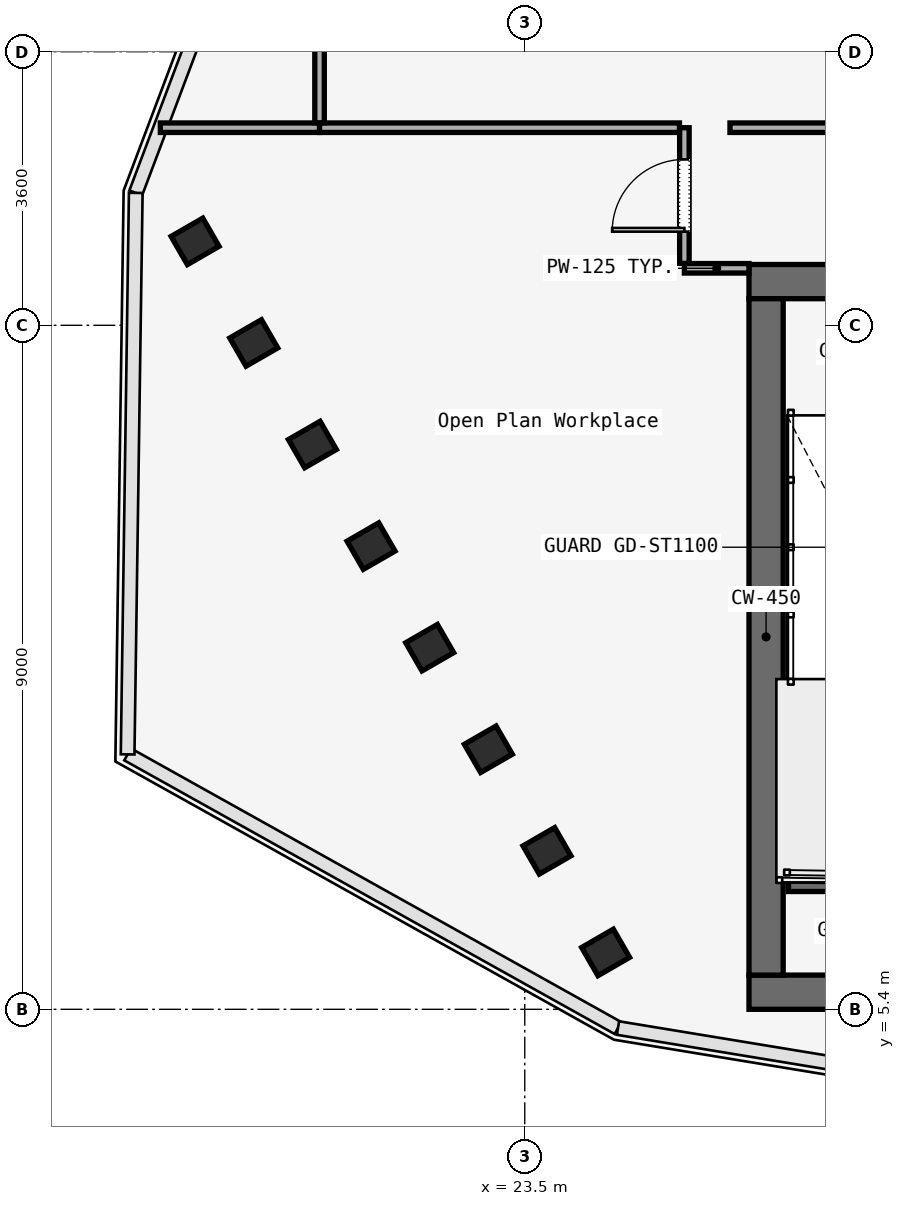
"""IFC4 building model, lengths in metres.
Left out: names, types, materials, properties, quantities, classifications, styles, units other than length and angle.
Written with IfcOpenShell. Run it as: python <this file> out.ifc"""

import sys

from ifc_helpers import new_model, si_unit, direction, frame, frame_2d, origin, origin_2d, place, context, subcontext, project, spatial, rectangle, i_section, extrude, element, fill, save


model = new_model("IFC4")
c1 = context("Model", 3, precision=1e-05, world=origin(), true_north=direction((0.0, 1.0)))
c2 = subcontext(c1, "Body", "Model", "MODEL_VIEW")
j1 = project(units=[si_unit("LENGTHUNIT", "METRE"), si_unit("PLANEANGLEUNIT", "RADIAN")], contexts=[c1])
p1 = place(None, origin())
s1 = spatial("IfcSite", under=j1, at=p1, CompositionType="ELEMENT")
p2 = place(p1, origin())
s2 = spatial("IfcBuilding", under=s1, at=p2, CompositionType="ELEMENT")
p3 = place(p2, frame((0.0, 0.0, 117.4)))
s3 = spatial("IfcBuildingStorey", under=s2, at=p3, CompositionType="ELEMENT", Elevation=117.4)
p4 = place(p3, frame((26.45, 14.975, 0.0), z_axis=(0.0, 0.0, 1.0), x_axis=(1.0, 0.0, 0.0)))
e1 = element("IfcWall", 1, at=p4, inside=s3, PredefinedType="SOLIDWALL", context=c2, shape_type="SweptSolid", body=[
    extrude(rectangle(XDim=31.1, YDim=0.45, at=frame_2d((15.55, 0.0))), origin(), (0.0, 0.0, 1.0), 4.52),
])
p5 = place(p4, frame((1.65, 0.0, 0.0)))
e2 = element("IfcOpeningElement", 2, at=p5, cuts=e1, PredefinedType="OPENING", context=c2, shape_type="SweptSolid", body=[
    extrude(rectangle(XDim=1.1, YDim=2.2, at=frame_2d((0.55, 1.1))), frame((0.0, 0.225, 0.0), z_axis=(0.0, -1.0, 0.0), x_axis=(1.0, 0.0, 0.0)), (0.0, 0.0, 1.0), 0.45),
])
p6 = place(p4, frame((13.65, 0.0, 0.0)))
e3 = element("IfcOpeningElement", 3, at=p6, cuts=e1, PredefinedType="OPENING", context=c2, shape_type="SweptSolid", body=[
    extrude(rectangle(XDim=1.1, YDim=2.2, at=frame_2d((0.55, 1.1))), frame((0.0, 0.225, 0.0), z_axis=(0.0, -1.0, 0.0), x_axis=(1.0, 0.0, 0.0)), (0.0, 0.0, 1.0), 0.45),
])
p7 = place(p4, frame((25.55, 0.0, 0.0)))
e4 = element("IfcOpeningElement", 4, at=p7, cuts=e1, PredefinedType="OPENING", context=c2, shape_type="SweptSolid", body=[
    extrude(rectangle(XDim=1.1, YDim=2.2, at=frame_2d((0.55, 1.1))), frame((0.0, 0.225, 0.0), z_axis=(0.0, -1.0, 0.0), x_axis=(1.0, 0.0, 0.0)), (0.0, 0.0, 1.0), 0.45),
])
p8 = place(p4, frame((10.7, 0.0, 0.0)))
e5 = element("IfcOpeningElement", 5, at=p8, cuts=e1, PredefinedType="OPENING", context=c2, shape_type="SweptSolid", body=[
    extrude(rectangle(XDim=1.4, YDim=2.2, at=frame_2d((0.7, 1.1))), frame((0.0, 0.225, 0.0), z_axis=(0.0, -1.0, 0.0), x_axis=(1.0, 0.0, 0.0)), (0.0, 0.0, 1.0), 0.45),
])
p9 = place(p4, frame((19.35, 0.0, 0.0)))
e6 = element("IfcOpeningElement", 6, at=p9, cuts=e1, PredefinedType="OPENING", context=c2, shape_type="SweptSolid", body=[
    extrude(rectangle(XDim=1.1, YDim=2.2, at=frame_2d((0.55, 1.1))), frame((0.0, 0.225, 0.0), z_axis=(0.0, -1.0, 0.0), x_axis=(1.0, 0.0, 0.0)), (0.0, 0.0, 1.0), 0.45),
])
p10 = place(p4, frame((21.4, 0.0, 0.0)))
e7 = element("IfcOpeningElement", 7, at=p10, cuts=e1, PredefinedType="OPENING", context=c2, shape_type="SweptSolid", body=[
    extrude(rectangle(XDim=0.9, YDim=2.1, at=frame_2d((0.45, 1.05))), frame((0.0, 0.225, 0.0), z_axis=(0.0, -1.0, 0.0), x_axis=(1.0, 0.0, 0.0)), (0.0, 0.0, 1.0), 0.45),
])
p11 = place(p4, frame((23.35, 0.0, 0.0)))
e8 = element("IfcOpeningElement", 8, at=p11, cuts=e1, PredefinedType="OPENING", context=c2, shape_type="SweptSolid", body=[
    extrude(rectangle(XDim=1.3, YDim=2.3, at=frame_2d((0.65, 1.15))), frame((0.0, 0.225, 0.0), z_axis=(0.0, -1.0, 0.0), x_axis=(1.0, 0.0, 0.0)), (0.0, 0.0, 1.0), 0.45),
])
p12 = place(p3, frame((26.45, 5.625, 0.0), z_axis=(0.0, 0.0, 1.0), x_axis=(1.0, 0.0, 0.0)))
e9 = element("IfcWall", 9, at=p12, inside=s3, PredefinedType="SOLIDWALL", context=c2, shape_type="SweptSolid", body=[
    extrude(rectangle(XDim=31.1, YDim=0.45, at=frame_2d((15.55, 0.0))), origin(), (0.0, 0.0, 1.0), 4.52),
])
p13 = place(p3, frame((26.675, 5.85, 0.0), z_axis=(0.0, 0.0, 1.0), x_axis=(0.0, 1.0, 0.0)))
e10 = element("IfcWall", 10, at=p13, inside=s3, PredefinedType="SOLIDWALL", context=c2, shape_type="SweptSolid", body=[
    extrude(rectangle(XDim=8.9, YDim=0.45, at=frame_2d((4.45, 0.0))), origin(), (0.0, 0.0, 1.0), 4.52),
])
for number, where, z_axis, x_axis in (
    (11, (19.163, 15.504, 0.0), (0.0, 0.0, 1.0), (-0.5, 0.866, 0.0)),
    (12, (19.934, 14.168, 0.0), (0.0, 0.0, 1.0), (-0.5, 0.866, 0.0)),
    (13, (20.706, 12.831, 0.0), (0.0, 0.0, 1.0), (-0.5, 0.866, 0.0)),
    (14, (21.478, 11.495, 0.0), (0.0, 0.0, 1.0), (-0.5, 0.866, 0.0)),
    (15, (22.249, 10.158, 0.0), (0.0, 0.0, 1.0), (-0.5, 0.866, 0.0)),
    (16, (23.021, 8.821, 0.0), (0.0, 0.0, 1.0), (-0.5, 0.866, 0.0)),
    (17, (23.792, 7.485, 0.0), (0.0, 0.0, 1.0), (-0.5, 0.866, 0.0)),
    (18, (24.564, 6.148, 0.0), (0.0, 0.0, 1.0), (-0.5, 0.866, 0.0)),
):
    element("IfcColumn", number, at=place(p3, frame(where, z_axis=z_axis, x_axis=x_axis)), inside=s3, PredefinedType="COLUMN", context=c2, shape_type="SweptSolid", body=[
        extrude(i_section(OverallWidth=0.428, OverallDepth=0.481, WebThickness=0.051, FlangeThickness=0.065, FilletRadius=0.015, at=origin_2d()), origin(), (0.0, 0.0, 1.0), 4.52),
    ])
p14 = place(p3, frame((26.97, 7.05, 0.0), z_axis=(0.0, 0.0, 1.0), x_axis=(1.0, 0.0, 0.0)))
e19 = element("IfcWall", 19, at=p14, inside=s3, PredefinedType="SOLIDWALL", context=c2, shape_type="SweptSolid", body=[
    extrude(rectangle(XDim=3.115, YDim=0.2, at=frame_2d((1.558, 0.0))), origin(), (0.0, 0.0, 1.0), 4.8),
])
p15 = place(p3, frame((26.45, 15.15, 0.0), z_axis=(0.0, 0.0, 1.0), x_axis=(-1.0, 0.0, 0.0)))
e20 = element("IfcWall", 20, at=p15, inside=s3, PredefinedType="PARTITIONING", context=c2, shape_type="SweptSolid", body=[
    extrude(rectangle(XDim=0.85, YDim=0.125, at=frame_2d((0.425, 0.0))), origin(), (0.0, 0.0, 1.0), 3.39),
])
p16 = place(p3, frame((25.6, 15.215, 0.0), z_axis=(0.0, 0.0, 1.0), x_axis=(0.0, 1.0, 0.0)))
e21 = element("IfcWall", 21, at=p16, inside=s3, PredefinedType="PARTITIONING", context=c2, shape_type="SweptSolid", body=[
    extrude(rectangle(XDim=1.785, YDim=0.125, at=frame_2d((0.893, 0.0))), origin(), (0.0, 0.0, 1.0), 3.39),
])
p17 = place(p16, frame((0.417, 0.0, 0.0)))
e22 = element("IfcOpeningElement", 22, at=p17, cuts=e21, PredefinedType="OPENING", context=c2, shape_type="SweptSolid", body=[
    extrude(rectangle(XDim=0.95, YDim=2.2, at=frame_2d((0.475, 1.1))), frame((0.0, 0.062, 0.0), z_axis=(0.0, -1.0, 0.0), x_axis=(1.0, 0.0, 0.0)), (0.0, 0.0, 1.0), 0.125),
])
p18 = place(p3, frame((26.2, 17.0, 0.0), z_axis=(0.0, 0.0, 1.0), x_axis=(1.0, 0.0, 0.0)))
e23 = element("IfcWall", 23, at=p18, inside=s3, PredefinedType="PARTITIONING", context=c2, shape_type="SweptSolid", body=[
    extrude(rectangle(XDim=3.6, YDim=0.125, at=frame_2d((1.8, 0.0))), origin(), (0.0, 0.0, 1.0), 3.39),
])
p19 = place(p3, frame((18.705, 17.0, 0.0), z_axis=(0.0, 0.0, 1.0), x_axis=(1.0, 0.0, 0.0)))
e24 = element("IfcWall", 24, at=p19, inside=s3, PredefinedType="PARTITIONING", context=c2, shape_type="SweptSolid", body=[
    extrude(rectangle(XDim=2.095, YDim=0.125, at=frame_2d((1.047, 0.0))), origin(), (0.0, 0.0, 1.0), 3.39),
])
p20 = place(p3, frame((20.8, 17.0, 0.0), z_axis=(0.0, 0.0, 1.0), x_axis=(1.0, 0.0, 0.0)))
e25 = element("IfcWall", 25, at=p20, inside=s3, PredefinedType="PARTITIONING", context=c2, shape_type="SweptSolid", body=[
    extrude(rectangle(XDim=4.735, YDim=0.125, at=frame_2d((2.367, 0.0))), origin(), (0.0, 0.0, 1.0), 3.39),
])
p21 = place(p3, frame((20.8, 17.065, 0.0), z_axis=(0.0, 0.0, 1.0), x_axis=(0.0, 1.0, 0.0)))
e26 = element("IfcWall", 26, at=p21, inside=s3, PredefinedType="PARTITIONING", context=c2, shape_type="SweptSolid", body=[
    extrude(rectangle(XDim=5.49, YDim=0.125, at=frame_2d((2.745, 0.0))), origin(), (0.0, 0.0, 1.0), 3.39),
])
p22 = place(p17, origin())
e27 = element("IfcDoor", 27, at=p22, inside=s3, OperationType="SINGLE_SWING_RIGHT", PredefinedType="DOOR", context=c2, shape_type="SweptSolid", body=[
    extrude(rectangle(XDim=0.95, YDim=2.2, at=frame_2d((0.475, 1.1))), frame((0.0, 0.025, 0.0), z_axis=(0.0, -1.0, 0.0), x_axis=(1.0, 0.0, 0.0)), (0.0, 0.0, 1.0), 0.05),
])
fill(e22, e27)
save(model, sys.argv[1])
